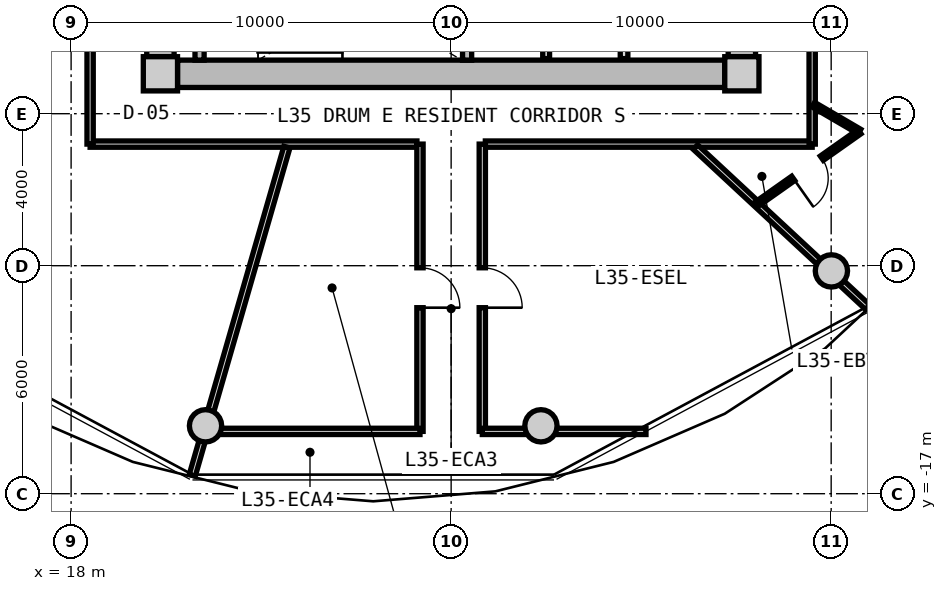
"""IFC4 building model, lengths in metres.
Left out: names, types, materials, properties, quantities, classifications, styles, units other than length and angle.
Written with IfcOpenShell. Run it as: python <this file> out.ifc"""

import sys

from ifc_helpers import new_model, si_unit, direction, frame, frame_2d, origin, origin_2d, place, context, subcontext, project, spatial, rectangle, circle, extrude, source, transform, mapped, element, fill, save


model = new_model("IFC4")
c1 = context("Model", 3, precision=1e-05, world=origin(), true_north=direction((0.0, 1.0)))
c2 = subcontext(c1, "Body", "Model", "MODEL_VIEW")
j1 = project(units=[si_unit("LENGTHUNIT", "METRE"), si_unit("PLANEANGLEUNIT", "RADIAN")], contexts=[c1])
p1 = place(None, origin())
s1 = spatial("IfcSite", under=j1, at=p1, CompositionType="ELEMENT")
p2 = place(p1, origin())
s2 = spatial("IfcBuilding", under=s1, at=p2, CompositionType="ELEMENT")
p3 = place(p2, frame((0.0, 0.0, 114.55)))
s3 = spatial("IfcBuildingStorey", under=s2, at=p3, CompositionType="ELEMENT", Elevation=114.55)
m1 = source(origin(), c2, "Body", "SweptSolid", [
    extrude(rectangle(XDim=0.9, YDim=0.9, at=origin_2d()), origin(), (0.0, 0.0, 1.0), 3.05),
])
for number, where, z_axis, x_axis in (
    (1, (20.35, -5.95, 0.0), (0.0, 0.0, 1.0), (1.0, 0.0, 0.0)),
    (2, (35.65, -5.95, 0.0), (0.0, 0.0, 1.0), (1.0, 0.0, 0.0)),
):
    element("IfcColumn", number, at=place(p3, frame(where, z_axis=z_axis, x_axis=x_axis)), inside=s3, PredefinedType="COLUMN", context=c2, shape_type="MappedRepresentation", body=[
        mapped(m1, transform((0.0, 0.0, 0.0), x_axis=(1.0, 0.0, 0.0), y_axis=(0.0, 1.0, 0.0), z_axis=(0.0, 0.0, 1.0), scale=1.0)),
    ])
m2 = source(origin(), c2, "Body", "SweptSolid", [
    extrude(rectangle(XDim=14.4, YDim=0.72, at=frame_2d((7.2, 0.0))), origin(), (0.0, 0.0, 1.0), 2.79),
])
p4 = place(p3, frame((35.2, -5.95, 0.0), z_axis=(0.0, 0.0, 1.0), x_axis=(-1.0, 0.0, 0.0)))
e3 = element("IfcWall", 3, at=p4, inside=s3, PredefinedType="SHEAR", context=c2, shape_type="MappedRepresentation", body=[
    mapped(m2, transform((0.0, 0.0, 0.0), x_axis=(1.0, 0.0, 0.0), y_axis=(0.0, 1.0, 0.0), z_axis=(0.0, 0.0, 1.0), scale=1.0)),
])
m3 = source(origin(), c2, "Body", "SweptSolid", [
    extrude(rectangle(XDim=11.0, YDim=0.72, at=frame_2d((5.5, 0.0))), origin(), (0.0, 0.0, 1.0), 2.79),
])
p5 = place(p3, frame((20.35, -5.5, 0.0), z_axis=(0.0, 0.0, 1.0), x_axis=(0.0, 1.0, 0.0)))
e4 = element("IfcWall", 4, at=p5, inside=s3, PredefinedType="SHEAR", context=c2, shape_type="MappedRepresentation", body=[
    mapped(m3, transform((0.0, 0.0, 0.0), x_axis=(1.0, 0.0, 0.0), y_axis=(0.0, 1.0, 0.0), z_axis=(0.0, 0.0, 1.0), scale=1.0)),
])
p6 = place(p5, frame((3.8, 0.0, 0.0)))
e5 = element("IfcOpeningElement", 5, at=p6, cuts=e4, PredefinedType="OPENING", context=c2, shape_type="SweptSolid", body=[
    extrude(rectangle(XDim=1.2, YDim=2.15, at=frame_2d((0.6, 1.075))), frame((0.0, 0.37, 0.0), z_axis=(0.0, -1.0, 0.0), x_axis=(1.0, 0.0, 0.0)), (0.0, 0.0, 1.0), 0.74),
])
p7 = place(p3, frame((35.65, 5.5, 0.0), z_axis=(0.0, 0.0, 1.0), x_axis=(0.0, -1.0, 0.0)))
e6 = element("IfcWall", 6, at=p7, inside=s3, PredefinedType="SHEAR", context=c2, shape_type="MappedRepresentation", body=[
    mapped(m3, transform((0.0, 0.0, 0.0), x_axis=(1.0, 0.0, 0.0), y_axis=(0.0, 1.0, 0.0), z_axis=(0.0, 0.0, 1.0), scale=1.0)),
])
p8 = place(p7, frame((5.65, 0.0, 0.0)))
e7 = element("IfcOpeningElement", 7, at=p8, cuts=e6, PredefinedType="OPENING", context=c2, shape_type="SweptSolid", body=[
    extrude(rectangle(XDim=1.2, YDim=2.15, at=frame_2d((0.6, 1.075))), frame((0.0, 0.37, 0.0), z_axis=(0.0, -1.0, 0.0), x_axis=(1.0, 0.0, 0.0)), (0.0, 0.0, 1.0), 0.74),
])
p9 = place(p7, frame((9.3, 0.0, 0.0)))
e8 = element("IfcOpeningElement", 8, at=p9, cuts=e6, PredefinedType="OPENING", context=c2, shape_type="SweptSolid", body=[
    extrude(rectangle(XDim=1.0, YDim=2.1, at=frame_2d((0.5, 1.05))), frame((0.0, 0.37, 0.0), z_axis=(0.0, -1.0, 0.0), x_axis=(1.0, 0.0, 0.0)), (0.0, 0.0, 1.0), 0.74),
])
m4 = source(origin(), c2, "Body", "SweptSolid", [
    extrude(circle(Radius=0.425, at=origin_2d()), origin(), (0.0, 0.0, 1.0), 3.05),
])
for number, where, z_axis, x_axis in (
    (9, (21.537, -15.213, 0.0), (0.0, 0.0, 1.0), (1.0, 0.0, 0.0)),
    (10, (30.363, -15.213, 0.0), (0.0, 0.0, 1.0), (1.0, 0.0, 0.0)),
    (11, (38.006, -11.137, 0.0), (0.0, 0.0, 1.0), (1.0, 0.0, 0.0)),
):
    element("IfcColumn", number, at=place(p3, frame(where, z_axis=z_axis, x_axis=x_axis)), inside=s3, PredefinedType="COLUMN", context=c2, shape_type="MappedRepresentation", body=[
        mapped(m4, transform((0.0, 0.0, 0.0), x_axis=(1.0, 0.0, 0.0), y_axis=(0.0, 1.0, 0.0), z_axis=(0.0, 0.0, 1.0), scale=1.0)),
    ])
m5 = source(origin(), c2, "Body", "SweptSolid", [
    extrude(rectangle(XDim=3.14, YDim=0.24, at=frame_2d((1.57, 0.0))), origin(), (0.0, 0.0, 1.0), 2.79),
])
for number, where, z_axis, x_axis in (
    (12, (21.38, -5.59, 0.0), (0.0, 0.0, 1.0), (0.0, 1.0, 0.0)),
    (13, (28.42, -5.59, 0.0), (0.0, 0.0, 1.0), (0.0, 1.0, 0.0)),
):
    element("IfcWall", number, at=place(p3, frame(where, z_axis=z_axis, x_axis=x_axis)), inside=s3, PredefinedType="PARTITIONING", context=c2, shape_type="MappedRepresentation", body=[
        mapped(m5, transform((0.0, 0.0, 0.0), x_axis=(1.0, 0.0, 0.0), y_axis=(0.0, 1.0, 0.0), z_axis=(0.0, 0.0, 1.0), scale=1.0)),
    ])
m6 = source(origin(), c2, "Body", "SweptSolid", [
    extrude(rectangle(XDim=3.8, YDim=0.2, at=frame_2d((1.9, 0.0))), origin(), (0.0, 0.0, 1.0), 2.775),
])
p10 = place(p3, frame((32.55, -5.55, 0.0), z_axis=(0.0, 0.0, 1.0), x_axis=(0.0, 1.0, 0.0)))
e14 = element("IfcWall", 14, at=p10, inside=s3, PredefinedType="PARTITIONING", context=c2, shape_type="MappedRepresentation", body=[
    mapped(m6, transform((0.0, 0.0, 0.0), x_axis=(1.0, 0.0, 0.0), y_axis=(0.0, 1.0, 0.0), z_axis=(0.0, 0.0, 1.0), scale=1.0)),
])
m7 = source(origin(), c2, "Body", "SweptSolid", [
    extrude(rectangle(XDim=3.22, YDim=0.18, at=frame_2d((1.61, 0.0))), origin(), (0.0, 0.0, 1.0), 2.775),
])
p11 = place(p3, frame((30.5, -5.55, 0.0), z_axis=(0.0, 0.0, 1.0), x_axis=(0.0, 1.0, 0.0)))
e15 = element("IfcWall", 15, at=p11, inside=s3, PredefinedType="PARTITIONING", context=c2, shape_type="MappedRepresentation", body=[
    mapped(m7, transform((0.0, 0.0, 0.0), x_axis=(1.0, 0.0, 0.0), y_axis=(0.0, 1.0, 0.0), z_axis=(0.0, 0.0, 1.0), scale=1.0)),
])
m8 = source(origin(), c2, "Body", "SweptSolid", [
    extrude(rectangle(XDim=8.6, YDim=0.165, at=frame_2d((4.3, 0.0))), origin(), (0.0, 0.0, 1.0), 2.775),
])
for number, where, z_axis, x_axis in (
    (16, (37.5, -7.8, 0.0), (0.0, 0.0, 1.0), (-1.0, 0.0, 0.0)),
    (17, (27.1, -7.8, 0.0), (0.0, 0.0, 1.0), (-1.0, 0.0, 0.0)),
):
    element("IfcWall", number, at=place(p3, frame(where, z_axis=z_axis, x_axis=x_axis)), inside=s3, PredefinedType="PARTITIONING", context=c2, shape_type="MappedRepresentation", body=[
        mapped(m8, transform((0.0, 0.0, 0.0), x_axis=(1.0, 0.0, 0.0), y_axis=(0.0, 1.0, 0.0), z_axis=(0.0, 0.0, 1.0), scale=1.0)),
    ])
m9 = source(origin(), c2, "Body", "SweptSolid", [
    extrude(rectangle(XDim=15.6, YDim=0.165, at=frame_2d((7.8, 0.0))), origin(), (0.0, 0.0, 1.0), 2.775),
])
p12 = place(p3, frame((18.5, -7.8, 0.0), z_axis=(0.0, 0.0, 1.0), x_axis=(0.0, 1.0, 0.0)))
e18 = element("IfcWall", 18, at=p12, inside=s3, PredefinedType="PARTITIONING", context=c2, shape_type="MappedRepresentation", body=[
    mapped(m9, transform((0.0, 0.0, 0.0), x_axis=(1.0, 0.0, 0.0), y_axis=(0.0, 1.0, 0.0), z_axis=(0.0, 0.0, 1.0), scale=1.0)),
])
p13 = place(p12, frame((10.383, 0.0, 0.0)))
e19 = element("IfcOpeningElement", 19, at=p13, cuts=e18, PredefinedType="OPENING", context=c2, shape_type="SweptSolid", body=[
    extrude(rectangle(XDim=1.05, YDim=2.15, at=frame_2d((0.525, 1.075))), frame((0.0, 0.093, 0.0), z_axis=(0.0, -1.0, 0.0), x_axis=(1.0, 0.0, 0.0)), (0.0, 0.0, 1.0), 0.185),
])
p14 = place(p12, frame((4.353, 0.0, 0.0)))
e20 = element("IfcOpeningElement", 20, at=p14, cuts=e18, PredefinedType="OPENING", context=c2, shape_type="SweptSolid", body=[
    extrude(rectangle(XDim=1.25, YDim=2.2, at=frame_2d((0.625, 1.1))), frame((0.0, 0.093, 0.0), z_axis=(0.0, -1.0, 0.0), x_axis=(1.0, 0.0, 0.0)), (0.0, 0.0, 1.0), 0.185),
])
p15 = place(p3, frame((37.5, 7.8, 0.0), z_axis=(0.0, 0.0, 1.0), x_axis=(0.0, -1.0, 0.0)))
e21 = element("IfcWall", 21, at=p15, inside=s3, PredefinedType="PARTITIONING", context=c2, shape_type="MappedRepresentation", body=[
    mapped(m9, transform((0.0, 0.0, 0.0), x_axis=(1.0, 0.0, 0.0), y_axis=(0.0, 1.0, 0.0), z_axis=(0.0, 0.0, 1.0), scale=1.0)),
])
p16 = place(p15, frame((6.87, 0.0, 0.0)))
e22 = element("IfcOpeningElement", 22, at=p16, cuts=e21, PredefinedType="OPENING", context=c2, shape_type="SweptSolid", body=[
    extrude(rectangle(XDim=1.05, YDim=2.15, at=frame_2d((0.525, 1.075))), frame((0.0, 0.093, 0.0), z_axis=(0.0, -1.0, 0.0), x_axis=(1.0, 0.0, 0.0)), (0.0, 0.0, 1.0), 0.185),
])
m10 = source(origin(), c2, "Body", "SweptSolid", [
    extrude(rectangle(XDim=8.989, YDim=0.165, at=frame_2d((4.495, 0.0))), origin(), (0.0, 0.0, 1.0), 2.275),
])
p17 = place(p3, frame((23.678, -7.88, 0.0), z_axis=(0.0, 0.0, 1.0), x_axis=(-0.27702323008, -0.960863221274, 0.0)))
e23 = element("IfcWall", 23, at=p17, inside=s3, PredefinedType="PARTITIONING", context=c2, shape_type="MappedRepresentation", body=[
    mapped(m10, transform((0.0, 0.0, 0.0), x_axis=(1.0, 0.0, 0.0), y_axis=(0.0, 1.0, 0.0), z_axis=(0.0, 0.0, 1.0), scale=1.0)),
])
m11 = source(origin(), c2, "Body", "SweptSolid", [
    extrude(rectangle(XDim=6.187, YDim=0.165, at=frame_2d((3.093, 0.0))), origin(), (0.0, 0.0, 1.0), 2.275),
])
p18 = place(p3, frame((34.429, -7.88, 0.0), z_axis=(0.0, 0.0, 1.0), x_axis=(0.732501077882, -0.680765870841, 0.0)))
e24 = element("IfcWall", 24, at=p18, inside=s3, PredefinedType="PARTITIONING", context=c2, shape_type="MappedRepresentation", body=[
    mapped(m11, transform((0.0, 0.0, 0.0), x_axis=(1.0, 0.0, 0.0), y_axis=(0.0, 1.0, 0.0), z_axis=(0.0, 0.0, 1.0), scale=1.0)),
])
m12 = source(origin(), c2, "Body", "SweptSolid", [
    extrude(rectangle(XDim=7.56, YDim=0.165, at=frame_2d((3.78, 0.0))), origin(), (0.0, 0.0, 1.0), 2.775),
])
p19 = place(p3, frame((27.18, -15.36, 0.0), z_axis=(0.0, 0.0, 1.0), x_axis=(0.0, 1.0, 0.0)))
e25 = element("IfcWall", 25, at=p19, inside=s3, PredefinedType="PARTITIONING", context=c2, shape_type="MappedRepresentation", body=[
    mapped(m12, transform((0.0, 0.0, 0.0), x_axis=(1.0, 0.0, 0.0), y_axis=(0.0, 1.0, 0.0), z_axis=(0.0, 0.0, 1.0), scale=1.0)),
])
p20 = place(p19, frame((3.255, 0.0, 0.0)))
e26 = element("IfcOpeningElement", 26, at=p20, cuts=e25, PredefinedType="OPENING", context=c2, shape_type="SweptSolid", body=[
    extrude(rectangle(XDim=1.05, YDim=2.15, at=frame_2d((0.525, 1.075))), frame((0.0, 0.093, 0.0), z_axis=(0.0, -1.0, 0.0), x_axis=(1.0, 0.0, 0.0)), (0.0, 0.0, 1.0), 0.185),
])
m13 = source(origin(), c2, "Body", "SweptSolid", [
    extrude(rectangle(XDim=5.814, YDim=0.165, at=frame_2d((2.907, 0.0))), origin(), (0.0, 0.0, 1.0), 2.275),
])
p21 = place(p3, frame((21.366, -15.36, 0.0), z_axis=(0.0, 0.0, 1.0), x_axis=(1.0, 0.0, 0.0)))
e27 = element("IfcWall", 27, at=p21, inside=s3, PredefinedType="PARTITIONING", context=c2, shape_type="MappedRepresentation", body=[
    mapped(m13, transform((0.0, 0.0, 0.0), x_axis=(1.0, 0.0, 0.0), y_axis=(0.0, 1.0, 0.0), z_axis=(0.0, 0.0, 1.0), scale=1.0)),
])
p22 = place(p3, frame((28.82, -15.36, 0.0), z_axis=(0.0, 0.0, 1.0), x_axis=(0.0, 1.0, 0.0)))
e28 = element("IfcWall", 28, at=p22, inside=s3, PredefinedType="PARTITIONING", context=c2, shape_type="MappedRepresentation", body=[
    mapped(m12, transform((0.0, 0.0, 0.0), x_axis=(1.0, 0.0, 0.0), y_axis=(0.0, 1.0, 0.0), z_axis=(0.0, 0.0, 1.0), scale=1.0)),
])
p23 = place(p22, frame((3.255, 0.0, 0.0)))
e29 = element("IfcOpeningElement", 29, at=p23, cuts=e28, PredefinedType="OPENING", context=c2, shape_type="SweptSolid", body=[
    extrude(rectangle(XDim=1.05, YDim=2.15, at=frame_2d((0.525, 1.075))), frame((0.0, 0.093, 0.0), z_axis=(0.0, -1.0, 0.0), x_axis=(1.0, 0.0, 0.0)), (0.0, 0.0, 1.0), 0.185),
])
m14 = source(origin(), c2, "Body", "SweptSolid", [
    extrude(rectangle(XDim=4.307, YDim=0.165, at=frame_2d((2.153, 0.0))), origin(), (0.0, 0.0, 1.0), 2.275),
])
p24 = place(p3, frame((28.82, -15.36, 0.0), z_axis=(0.0, 0.0, 1.0), x_axis=(1.0, 0.0, 0.0)))
e30 = element("IfcWall", 30, at=p24, inside=s3, PredefinedType="PARTITIONING", context=c2, shape_type="MappedRepresentation", body=[
    mapped(m14, transform((0.0, 0.0, 0.0), x_axis=(1.0, 0.0, 0.0), y_axis=(0.0, 1.0, 0.0), z_axis=(0.0, 0.0, 1.0), scale=1.0)),
])
m15 = source(origin(), c2, "Body", "SweptSolid", [
    extrude(rectangle(XDim=1.407, YDim=0.14, at=frame_2d((0.704, 0.0))), origin(), (0.0, 0.0, 1.0), 2.775),
])
p25 = place(p3, frame((37.53, -6.762, 0.0), z_axis=(0.0, 0.0, 1.0), x_axis=(0.863539718977, -0.504280828258, 0.0)))
e31 = element("IfcWall", 31, at=p25, inside=s3, PredefinedType="PARTITIONING", context=c2, shape_type="MappedRepresentation", body=[
    mapped(m15, transform((0.0, 0.0, 0.0), x_axis=(1.0, 0.0, 0.0), y_axis=(0.0, 1.0, 0.0), z_axis=(0.0, 0.0, 1.0), scale=1.0)),
])
m16 = source(origin(), c2, "Body", "SweptSolid", [
    extrude(rectangle(XDim=3.347, YDim=0.14, at=frame_2d((1.673, 0.0))), origin(), (0.0, 0.0, 1.0), 2.775),
])
p26 = place(p3, frame((38.745, -7.472, 0.0), z_axis=(0.0, 0.0, 1.0), x_axis=(-0.81705680263, -0.576557179537, 0.0)))
e32 = element("IfcWall", 32, at=p26, inside=s3, PredefinedType="PARTITIONING", context=c2, shape_type="MappedRepresentation", body=[
    mapped(m16, transform((0.0, 0.0, 0.0), x_axis=(1.0, 0.0, 0.0), y_axis=(0.0, 1.0, 0.0), z_axis=(0.0, 0.0, 1.0), scale=1.0)),
])
p27 = place(p26, frame((1.214, 0.0, 0.0)))
e33 = element("IfcOpeningElement", 33, at=p27, cuts=e32, PredefinedType="OPENING", context=c2, shape_type="SweptSolid", body=[
    extrude(rectangle(XDim=0.92, YDim=2.1, at=frame_2d((0.46, 1.05))), frame((0.0, 0.08, 0.0), z_axis=(0.0, -1.0, 0.0), x_axis=(1.0, 0.0, 0.0)), (0.0, 0.0, 1.0), 0.16),
])
m17 = source(origin(), c2, "Body", "SweptSolid", [
    extrude(rectangle(XDim=1.05, YDim=2.15, at=frame_2d((0.525, 1.075))), frame((0.0, 0.025, 0.0), z_axis=(0.0, -1.0, 0.0), x_axis=(1.0, 0.0, 0.0)), (0.0, 0.0, 1.0), 0.05),
])
p28 = place(p20, frame((1.05, 0.0, 0.0), z_axis=(0.0, 0.0, 1.0), x_axis=(-1.0, 0.0, 0.0)))
e34 = element("IfcDoor", 34, at=p28, inside=s3, OperationType="SINGLE_SWING_RIGHT", PredefinedType="DOOR", context=c2, shape_type="MappedRepresentation", body=[
    mapped(m17, transform((0.0, 0.0, 0.0), x_axis=(1.0, 0.0, 0.0), y_axis=(0.0, 1.0, 0.0), z_axis=(0.0, 0.0, 1.0), scale=1.0)),
])
fill(e26, e34)
p29 = place(p23, frame((1.05, 0.0, 0.0), z_axis=(0.0, 0.0, 1.0), x_axis=(-1.0, 0.0, 0.0)))
e35 = element("IfcDoor", 35, at=p29, inside=s3, OperationType="SINGLE_SWING_RIGHT", PredefinedType="DOOR", context=c2, shape_type="MappedRepresentation", body=[
    mapped(m17, transform((0.0, 0.0, 0.0), x_axis=(1.0, 0.0, 0.0), y_axis=(0.0, 1.0, 0.0), z_axis=(0.0, 0.0, 1.0), scale=1.0)),
])
fill(e29, e35)
m18 = source(origin(), c2, "Body", "SweptSolid", [
    extrude(rectangle(XDim=0.92, YDim=2.1, at=frame_2d((0.46, 1.05))), frame((0.0, 0.025, 0.0), z_axis=(0.0, -1.0, 0.0), x_axis=(1.0, 0.0, 0.0)), (0.0, 0.0, 1.0), 0.05),
])
p30 = place(p27, origin())
e36 = element("IfcDoor", 36, at=p30, inside=s3, OperationType="SINGLE_SWING_RIGHT", PredefinedType="DOOR", context=c2, shape_type="MappedRepresentation", body=[
    mapped(m18, transform((0.0, 0.0, 0.0), x_axis=(1.0, 0.0, 0.0), y_axis=(0.0, 1.0, 0.0), z_axis=(0.0, 0.0, 1.0), scale=1.0)),
])
fill(e33, e36)
save(model, sys.argv[1])
